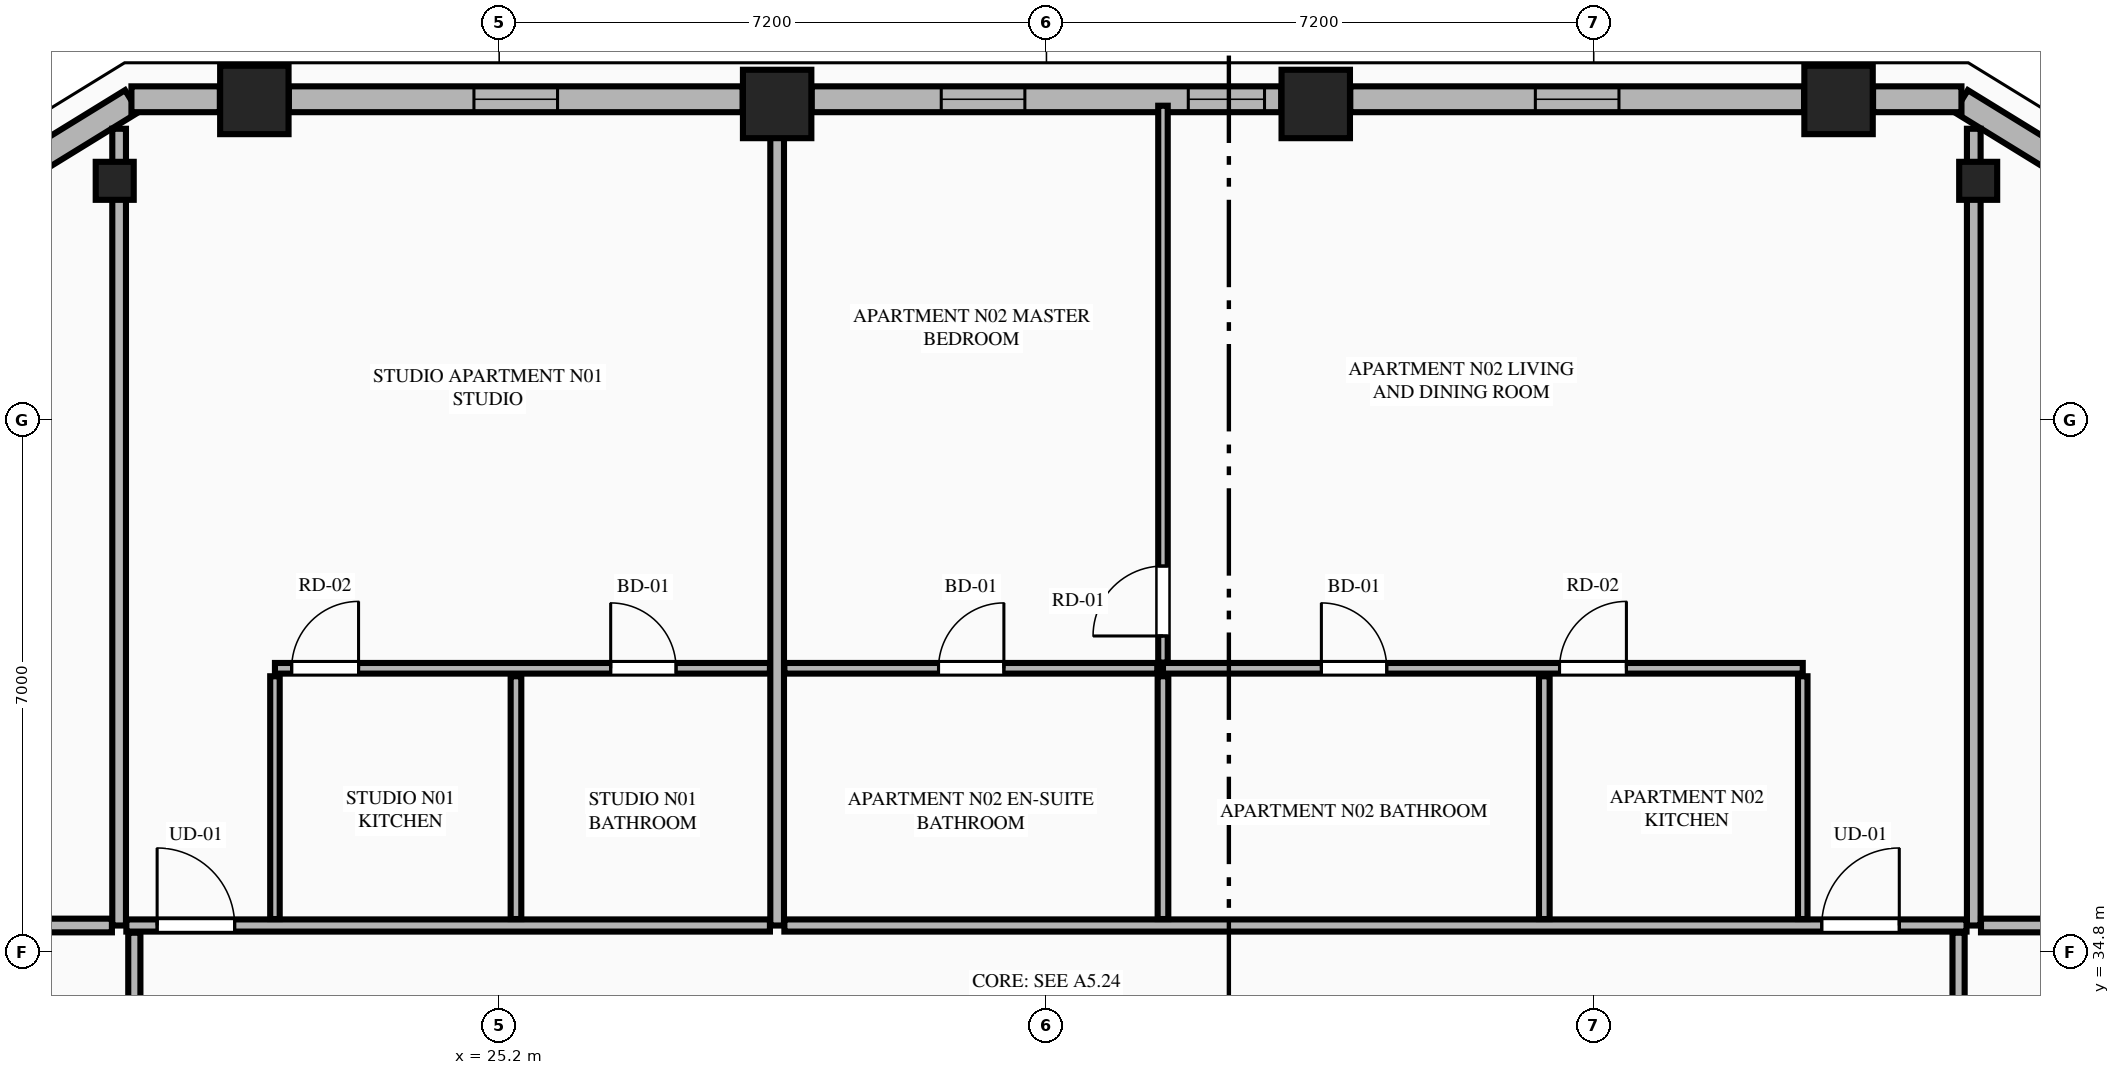
"""IFC4 building model, lengths in metres.
Left out: names, types, materials, properties, quantities, classifications, styles, units other than length and angle.
Written with IfcOpenShell. Run it as: python <this file> out.ifc"""

import sys

from ifc_helpers import new_model, si_unit, direction, frame, frame_2d, origin, origin_2d, place, context, subcontext, project, spatial, rectangle, extrude, element, fill, save


model = new_model("IFC4")
c1 = context("Model", 3, precision=1e-05, world=origin(), true_north=direction((0.0, 1.0)))
c2 = subcontext(c1, "Body", "Model", "MODEL_VIEW")
j1 = project(units=[si_unit("LENGTHUNIT", "METRE"), si_unit("PLANEANGLEUNIT", "RADIAN")], contexts=[c1])
p1 = place(None, origin())
s1 = spatial("IfcSite", under=j1, at=p1, CompositionType="ELEMENT")
p2 = place(p1, origin())
s2 = spatial("IfcBuilding", under=s1, at=p2, CompositionType="ELEMENT")
p3 = place(p2, frame((0.0, 0.0, 193.2)))
s3 = spatial("IfcBuildingStorey", under=s2, at=p3, CompositionType="ELEMENT", Elevation=193.2)
for number, where, z_axis, x_axis in (
    (1, (42.821, 46.011, 0.0), (0.0, 0.0, 1.0), (1.0, 0.0, 0.0)),
    (2, (35.943, 45.958, 0.0), (0.0, 0.0, 1.0), (1.0, 0.0, 0.0)),
    (3, (28.857, 45.958, 0.0), (0.0, 0.0, 1.0), (1.0, 0.0, 0.0)),
    (4, (21.979, 46.011, 0.0), (0.0, 0.0, 1.0), (1.0, 0.0, 0.0)),
):
    element("IfcColumn", number, at=place(p3, frame(where, z_axis=z_axis, x_axis=x_axis)), inside=s3, PredefinedType="COLUMN", context=c2, shape_type="SweptSolid", body=[
        extrude(rectangle(XDim=0.9, YDim=0.9, at=origin_2d()), origin(), (0.0, 0.0, 1.0), 3.55),
    ])
for number, where, z_axis, x_axis in (
    (5, (44.658, 44.947, 0.0), (0.0, 0.0, 1.0), (-0.865, 0.501, 0.0)),
    (6, (20.142, 44.947, 0.0), (0.0, 0.0, 1.0), (-0.865, -0.501, 0.0)),
):
    element("IfcColumn", number, at=place(p3, frame(where, z_axis=z_axis, x_axis=x_axis)), inside=s3, PredefinedType="PILASTER", context=c2, shape_type="SweptSolid", body=[
        extrude(rectangle(XDim=0.5, YDim=0.35, at=origin_2d()), origin(), (0.0, 0.0, 1.0), 3.55),
    ])
for number, where, z_axis, x_axis in (
    (7, (45.862, 45.116, 0.0), (0.0, 0.0, 1.0), (-0.852, 0.524, 0.0)),
    (8, (20.367, 45.995, 0.0), (0.0, 0.0, 1.0), (-0.852, -0.524, 0.0)),
):
    element("IfcWall", number, at=place(p3, frame(where, z_axis=z_axis, x_axis=x_axis)), inside=s3, PredefinedType="STANDARD", context=c2, shape_type="SweptSolid", body=[
        extrude(rectangle(XDim=1.678, YDim=0.34, at=frame_2d((0.839, 0.0))), origin(), (0.0, 0.0, 1.0), 3.35),
    ])
p4 = place(p3, frame((44.438, 46.02, 0.0), z_axis=(0.0, 0.0, 1.0), x_axis=(-1.0, 0.0, 0.0)))
e9 = element("IfcWall", 9, at=p4, inside=s3, PredefinedType="STANDARD", context=c2, shape_type="SweptSolid", body=[
    extrude(rectangle(XDim=1.163, YDim=0.34, at=frame_2d((0.582, 0.0))), origin(), (0.0, 0.0, 1.0), 3.35),
])
p5 = place(p3, frame((42.367, 46.02, 0.0), z_axis=(0.0, 0.0, 1.0), x_axis=(-1.0, 0.0, 0.0)))
e10 = element("IfcWall", 10, at=p5, inside=s3, PredefinedType="STANDARD", context=c2, shape_type="SweptSolid", body=[
    extrude(rectangle(XDim=5.97, YDim=0.34, at=frame_2d((2.985, 0.0))), origin(), (0.0, 0.0, 1.0), 2.883),
])
p6 = place(p5, frame((2.435, 0.0, 0.75)))
e11 = element("IfcOpeningElement", 11, at=p6, cuts=e10, PredefinedType="OPENING", context=c2, shape_type="SweptSolid", body=[
    extrude(rectangle(XDim=1.1, YDim=1.983, at=frame_2d((0.55, 0.991))), frame((0.0, 0.18, 0.0), z_axis=(0.0, -1.0, 0.0), x_axis=(1.0, 0.0, 0.0)), (0.0, 0.0, 1.0), 0.36),
])
p7 = place(p3, frame((35.489, 46.02, 0.0), z_axis=(0.0, 0.0, 1.0), x_axis=(-1.0, 0.0, 0.0)))
e12 = element("IfcWall", 12, at=p7, inside=s3, PredefinedType="STANDARD", context=c2, shape_type="SweptSolid", body=[
    extrude(rectangle(XDim=6.178, YDim=0.34, at=frame_2d((3.089, 0.0))), origin(), (0.0, 0.0, 1.0), 2.883),
])
p8 = place(p7, frame((0.22, 0.0, 0.75)))
e13 = element("IfcOpeningElement", 13, at=p8, cuts=e12, PredefinedType="OPENING", context=c2, shape_type="SweptSolid", body=[
    extrude(rectangle(XDim=1.003, YDim=1.983, at=frame_2d((0.501, 0.991))), frame((0.0, 0.18, 0.0), z_axis=(0.0, -1.0, 0.0), x_axis=(1.0, 0.0, 0.0)), (0.0, 0.0, 1.0), 0.36),
])
p9 = place(p7, frame((3.373, 0.0, 0.75)))
e14 = element("IfcOpeningElement", 14, at=p9, cuts=e12, PredefinedType="OPENING", context=c2, shape_type="SweptSolid", body=[
    extrude(rectangle(XDim=1.1, YDim=1.983, at=frame_2d((0.55, 0.991))), frame((0.0, 0.18, 0.0), z_axis=(0.0, -1.0, 0.0), x_axis=(1.0, 0.0, 0.0)), (0.0, 0.0, 1.0), 0.36),
])
p10 = place(p3, frame((28.403, 46.02, 0.0), z_axis=(0.0, 0.0, 1.0), x_axis=(-1.0, 0.0, 0.0)))
e15 = element("IfcWall", 15, at=p10, inside=s3, PredefinedType="STANDARD", context=c2, shape_type="SweptSolid", body=[
    extrude(rectangle(XDim=5.97, YDim=0.34, at=frame_2d((2.985, 0.0))), origin(), (0.0, 0.0, 1.0), 2.883),
])
p11 = place(p10, frame((2.435, 0.0, 0.75)))
e16 = element("IfcOpeningElement", 16, at=p11, cuts=e15, PredefinedType="OPENING", context=c2, shape_type="SweptSolid", body=[
    extrude(rectangle(XDim=1.1, YDim=1.983, at=frame_2d((0.55, 0.991))), frame((0.0, 0.18, 0.0), z_axis=(0.0, -1.0, 0.0), x_axis=(1.0, 0.0, 0.0)), (0.0, 0.0, 1.0), 0.36),
])
p12 = place(p3, frame((21.525, 46.02, 0.0), z_axis=(0.0, 0.0, 1.0), x_axis=(-1.0, 0.0, 0.0)))
e17 = element("IfcWall", 17, at=p12, inside=s3, PredefinedType="STANDARD", context=c2, shape_type="SweptSolid", body=[
    extrude(rectangle(XDim=1.163, YDim=0.34, at=frame_2d((0.582, 0.0))), origin(), (0.0, 0.0, 1.0), 3.35),
])
p13 = place(p3, frame((20.2, 35.15, 0.0), z_axis=(0.0, 0.0, 1.0), x_axis=(0.0, 1.0, 0.0)))
e18 = element("IfcWall", 18, at=p13, inside=s3, PredefinedType="PARTITIONING", context=c2, shape_type="SweptSolid", body=[
    extrude(rectangle(XDim=10.482, YDim=0.18, at=frame_2d((5.241, 0.0))), origin(), (0.0, 0.0, 1.0), 3.35),
])
p14 = place(p3, frame((28.857, 35.15, 0.0), z_axis=(0.0, 0.0, 1.0), x_axis=(0.0, 1.0, 0.0)))
e19 = element("IfcWall", 19, at=p14, inside=s3, PredefinedType="PARTITIONING", context=c2, shape_type="SweptSolid", body=[
    extrude(rectangle(XDim=10.695, YDim=0.18, at=frame_2d((5.348, 0.0))), origin(), (0.0, 0.0, 1.0), 2.807),
])
p15 = place(p3, frame((44.6, 35.15, 0.0), z_axis=(0.0, 0.0, 1.0), x_axis=(0.0, 1.0, 0.0)))
e20 = element("IfcWall", 20, at=p15, inside=s3, PredefinedType="PARTITIONING", context=c2, shape_type="SweptSolid", body=[
    extrude(rectangle(XDim=10.482, YDim=0.18, at=frame_2d((5.241, 0.0))), origin(), (0.0, 0.0, 1.0), 3.35),
])
p16 = place(p3, frame((20.295, 35.15, 0.0), z_axis=(0.0, 0.0, 1.0), x_axis=(1.0, 0.0, 0.0)))
e21 = element("IfcWall", 21, at=p16, inside=s3, PredefinedType="PARTITIONING", context=c2, shape_type="SweptSolid", body=[
    extrude(rectangle(XDim=8.467, YDim=0.16, at=frame_2d((4.233, 0.0))), origin(), (0.0, 0.0, 1.0), 3.35),
])
p17 = place(p16, frame((0.405, 0.0, 0.0)))
e22 = element("IfcOpeningElement", 22, at=p17, cuts=e21, PredefinedType="OPENING", context=c2, shape_type="SweptSolid", body=[
    extrude(rectangle(XDim=1.02, YDim=2.25, at=frame_2d((0.51, 1.125))), frame((0.0, 0.09, 0.0), z_axis=(0.0, -1.0, 0.0), x_axis=(1.0, 0.0, 0.0)), (0.0, 0.0, 1.0), 0.18),
])
p18 = place(p3, frame((22.25, 35.235, 0.0), z_axis=(0.0, 0.0, 1.0), x_axis=(0.0, 1.0, 0.0)))
e23 = element("IfcWall", 23, at=p18, inside=s3, PredefinedType="PARTITIONING", context=c2, shape_type="SweptSolid", body=[
    extrude(rectangle(XDim=3.194, YDim=0.125, at=frame_2d((1.597, 0.0))), origin(), (0.0, 0.0, 1.0), 2.807),
])
p19 = place(p3, frame((22.25, 38.534, 0.0), z_axis=(0.0, 0.0, 1.0), x_axis=(1.0, 0.0, 0.0)))
e24 = element("IfcWall", 24, at=p19, inside=s3, PredefinedType="PLUMBINGWALL", context=c2, shape_type="SweptSolid", body=[
    extrude(rectangle(XDim=6.512, YDim=0.14, at=frame_2d((3.256, 0.0))), origin(), (0.0, 0.0, 1.0), 3.35),
])
p20 = place(p19, frame((4.417, 0.0, 0.0)))
e25 = element("IfcOpeningElement", 25, at=p20, cuts=e24, PredefinedType="OPENING", context=c2, shape_type="SweptSolid", body=[
    extrude(rectangle(XDim=0.86, YDim=2.1, at=frame_2d((0.43, 1.05))), frame((0.0, 0.08, 0.0), z_axis=(0.0, -1.0, 0.0), x_axis=(1.0, 0.0, 0.0)), (0.0, 0.0, 1.0), 0.16),
])
p21 = place(p19, frame((0.22, 0.0, 0.0)))
e26 = element("IfcOpeningElement", 26, at=p21, cuts=e24, PredefinedType="OPENING", context=c2, shape_type="SweptSolid", body=[
    extrude(rectangle(XDim=0.88, YDim=2.15, at=frame_2d((0.44, 1.075))), frame((0.0, 0.08, 0.0), z_axis=(0.0, -1.0, 0.0), x_axis=(1.0, 0.0, 0.0)), (0.0, 0.0, 1.0), 0.16),
])
p22 = place(p3, frame((25.421, 35.235, 0.0), z_axis=(0.0, 0.0, 1.0), x_axis=(0.0, 1.0, 0.0)))
e27 = element("IfcWall", 27, at=p22, inside=s3, PredefinedType="PLUMBINGWALL", context=c2, shape_type="SweptSolid", body=[
    extrude(rectangle(XDim=3.194, YDim=0.14, at=frame_2d((1.597, 0.0))), origin(), (0.0, 0.0, 1.0), 3.35),
])
p23 = place(p3, frame((28.952, 35.15, 0.0), z_axis=(0.0, 0.0, 1.0), x_axis=(1.0, 0.0, 0.0)))
e28 = element("IfcWall", 28, at=p23, inside=s3, PredefinedType="PARTITIONING", context=c2, shape_type="SweptSolid", body=[
    extrude(rectangle(XDim=15.553, YDim=0.16, at=frame_2d((7.776, 0.0))), origin(), (0.0, 0.0, 1.0), 3.35),
])
p24 = place(p23, frame((13.648, 0.0, 0.0)))
e29 = element("IfcOpeningElement", 29, at=p24, cuts=e28, PredefinedType="OPENING", context=c2, shape_type="SweptSolid", body=[
    extrude(rectangle(XDim=1.02, YDim=2.25, at=frame_2d((0.51, 1.125))), frame((0.0, 0.09, 0.0), z_axis=(0.0, -1.0, 0.0), x_axis=(1.0, 0.0, 0.0)), (0.0, 0.0, 1.0), 0.18),
])
p25 = place(p3, frame((42.35, 35.235, 0.0), z_axis=(0.0, 0.0, 1.0), x_axis=(0.0, 1.0, 0.0)))
e30 = element("IfcWall", 30, at=p25, inside=s3, PredefinedType="PARTITIONING", context=c2, shape_type="SweptSolid", body=[
    extrude(rectangle(XDim=3.194, YDim=0.125, at=frame_2d((1.597, 0.0))), origin(), (0.0, 0.0, 1.0), 2.807),
])
p26 = place(p3, frame((33.933, 38.534, 0.0), z_axis=(0.0, 0.0, 1.0), x_axis=(1.0, 0.0, 0.0)))
e31 = element("IfcWall", 31, at=p26, inside=s3, PredefinedType="PLUMBINGWALL", context=c2, shape_type="SweptSolid", body=[
    extrude(rectangle(XDim=8.417, YDim=0.14, at=frame_2d((4.208, 0.0))), origin(), (0.0, 0.0, 1.0), 3.35),
])
p27 = place(p26, frame((2.084, 0.0, 0.0)))
e32 = element("IfcOpeningElement", 32, at=p27, cuts=e31, PredefinedType="OPENING", context=c2, shape_type="SweptSolid", body=[
    extrude(rectangle(XDim=0.86, YDim=2.1, at=frame_2d((0.43, 1.05))), frame((0.0, 0.08, 0.0), z_axis=(0.0, -1.0, 0.0), x_axis=(1.0, 0.0, 0.0)), (0.0, 0.0, 1.0), 0.16),
])
p28 = place(p26, frame((5.217, 0.0, 0.0)))
e33 = element("IfcOpeningElement", 33, at=p28, cuts=e31, PredefinedType="OPENING", context=c2, shape_type="SweptSolid", body=[
    extrude(rectangle(XDim=0.88, YDim=2.15, at=frame_2d((0.44, 1.075))), frame((0.0, 0.08, 0.0), z_axis=(0.0, -1.0, 0.0), x_axis=(1.0, 0.0, 0.0)), (0.0, 0.0, 1.0), 0.16),
])
p29 = place(p3, frame((28.952, 38.534, 0.0), z_axis=(0.0, 0.0, 1.0), x_axis=(1.0, 0.0, 0.0)))
e34 = element("IfcWall", 34, at=p29, inside=s3, PredefinedType="PLUMBINGWALL", context=c2, shape_type="SweptSolid", body=[
    extrude(rectangle(XDim=4.906, YDim=0.14, at=frame_2d((2.453, 0.0))), origin(), (0.0, 0.0, 1.0), 3.35),
])
p30 = place(p29, frame((2.028, 0.0, 0.0)))
e35 = element("IfcOpeningElement", 35, at=p30, cuts=e34, PredefinedType="OPENING", context=c2, shape_type="SweptSolid", body=[
    extrude(rectangle(XDim=0.86, YDim=2.1, at=frame_2d((0.43, 1.05))), frame((0.0, 0.08, 0.0), z_axis=(0.0, -1.0, 0.0), x_axis=(1.0, 0.0, 0.0)), (0.0, 0.0, 1.0), 0.16),
])
for number, where, z_axis, x_axis in (
    (36, (38.95, 35.235, 0.0), (0.0, 0.0, 1.0), (0.0, 1.0, 0.0)),
    (37, (33.933, 35.235, 0.0), (0.0, 0.0, 1.0), (0.0, 1.0, 0.0)),
):
    element("IfcWall", number, at=place(p3, frame(where, z_axis=z_axis, x_axis=x_axis)), inside=s3, PredefinedType="PLUMBINGWALL", context=c2, shape_type="SweptSolid", body=[
        extrude(rectangle(XDim=3.194, YDim=0.14, at=frame_2d((1.597, 0.0))), origin(), (0.0, 0.0, 1.0), 3.35),
    ])
p31 = place(p3, frame((33.933, 38.609, 0.0), z_axis=(0.0, 0.0, 1.0), x_axis=(0.0, 1.0, 0.0)))
e38 = element("IfcWall", 38, at=p31, inside=s3, PredefinedType="PARTITIONING", context=c2, shape_type="SweptSolid", body=[
    extrude(rectangle(XDim=7.326, YDim=0.125, at=frame_2d((3.663, 0.0))), origin(), (0.0, 0.0, 1.0), 3.35),
])
p32 = place(p31, frame((0.35, 0.0, 0.0)))
e39 = element("IfcOpeningElement", 39, at=p32, cuts=e38, PredefinedType="OPENING", context=c2, shape_type="SweptSolid", body=[
    extrude(rectangle(XDim=0.92, YDim=2.15, at=frame_2d((0.46, 1.075))), frame((0.0, 0.073, 0.0), z_axis=(0.0, -1.0, 0.0), x_axis=(1.0, 0.0, 0.0)), (0.0, 0.0, 1.0), 0.145),
])
for number, where, z_axis, x_axis in (
    (40, (14.11, 35.15, 0.0), (0.0, 0.0, 1.0), (1.0, 0.0, 0.0)),
    (41, (44.695, 35.15, 0.0), (0.0, 0.0, 1.0), (1.0, 0.0, 0.0)),
):
    element("IfcWall", number, at=place(p3, frame(where, z_axis=z_axis, x_axis=x_axis)), inside=s3, PredefinedType="PARTITIONING", context=c2, shape_type="SweptSolid", body=[
        extrude(rectangle(XDim=5.995, YDim=0.18, at=frame_2d((2.998, 0.0))), origin(), (0.0, 0.0, 1.0), 3.35),
    ])
p33 = place(p3, frame((20.4, 26.551, 0.0), z_axis=(0.0, 0.0, 1.0), x_axis=(0.0, 1.0, 0.0)))
e42 = element("IfcWall", 42, at=p33, inside=s3, PredefinedType="PARTITIONING", context=c2, shape_type="SweptSolid", body=[
    extrude(rectangle(XDim=8.504, YDim=0.16, at=frame_2d((4.252, 0.0))), origin(), (0.0, 0.0, 1.0), 3.35),
])
p34 = place(p33, frame((0.4, 0.0, 0.0)))
e43 = element("IfcOpeningElement", 43, at=p34, cuts=e42, PredefinedType="OPENING", context=c2, shape_type="SweptSolid", body=[
    extrude(rectangle(XDim=1.02, YDim=2.25, at=frame_2d((0.51, 1.125))), frame((0.0, 0.09, 0.0), z_axis=(0.0, -1.0, 0.0), x_axis=(1.0, 0.0, 0.0)), (0.0, 0.0, 1.0), 0.18),
])
p35 = place(p3, frame((44.4, 16.345, 0.0), z_axis=(0.0, 0.0, 1.0), x_axis=(0.0, 1.0, 0.0)))
e44 = element("IfcWall", 44, at=p35, inside=s3, PredefinedType="PARTITIONING", context=c2, shape_type="SweptSolid", body=[
    extrude(rectangle(XDim=18.71, YDim=0.16, at=frame_2d((9.355, 0.0))), origin(), (0.0, 0.0, 1.0), 3.35),
])
p36 = place(p35, frame((0.45, 0.0, 0.0)))
e45 = element("IfcOpeningElement", 45, at=p36, cuts=e44, PredefinedType="OPENING", context=c2, shape_type="SweptSolid", body=[
    extrude(rectangle(XDim=1.02, YDim=2.25, at=frame_2d((0.51, 1.125))), frame((0.0, 0.09, 0.0), z_axis=(0.0, -1.0, 0.0), x_axis=(1.0, 0.0, 0.0)), (0.0, 0.0, 1.0), 0.18),
])
p37 = place(p6, origin())
e46 = element("IfcWindow", 46, at=p37, inside=s3, PartitioningType="SINGLE_PANEL", PredefinedType="WINDOW", context=c2, shape_type="SweptSolid", body=[
    extrude(rectangle(XDim=1.1, YDim=1.983, at=frame_2d((0.55, 0.991))), frame((0.0, 0.03, 0.0), z_axis=(0.0, -1.0, 0.0), x_axis=(1.0, 0.0, 0.0)), (0.0, 0.0, 1.0), 0.06),
])
fill(e11, e46)
p38 = place(p8, origin())
e47 = element("IfcWindow", 47, at=p38, inside=s3, PartitioningType="SINGLE_PANEL", PredefinedType="WINDOW", context=c2, shape_type="SweptSolid", body=[
    extrude(rectangle(XDim=1.003, YDim=1.983, at=frame_2d((0.501, 0.991))), frame((0.0, 0.03, 0.0), z_axis=(0.0, -1.0, 0.0), x_axis=(1.0, 0.0, 0.0)), (0.0, 0.0, 1.0), 0.06),
])
fill(e13, e47)
p39 = place(p11, origin())
e48 = element("IfcWindow", 48, at=p39, inside=s3, PartitioningType="SINGLE_PANEL", PredefinedType="WINDOW", context=c2, shape_type="SweptSolid", body=[
    extrude(rectangle(XDim=1.1, YDim=1.983, at=frame_2d((0.55, 0.991))), frame((0.0, 0.03, 0.0), z_axis=(0.0, -1.0, 0.0), x_axis=(1.0, 0.0, 0.0)), (0.0, 0.0, 1.0), 0.06),
])
fill(e16, e48)
p40 = place(p20, origin())
e49 = element("IfcDoor", 49, at=p40, inside=s3, OperationType="SINGLE_SWING_LEFT", PredefinedType="DOOR", context=c2, shape_type="SweptSolid", body=[
    extrude(rectangle(XDim=0.86, YDim=2.1, at=frame_2d((0.43, 1.05))), frame((0.0, 0.025, 0.0), z_axis=(0.0, -1.0, 0.0), x_axis=(1.0, 0.0, 0.0)), (0.0, 0.0, 1.0), 0.05),
])
fill(e25, e49)
p41 = place(p17, origin())
e50 = element("IfcDoor", 50, at=p41, inside=s3, OperationType="SINGLE_SWING_LEFT", PredefinedType="DOOR", context=c2, shape_type="SweptSolid", body=[
    extrude(rectangle(XDim=1.02, YDim=2.25, at=frame_2d((0.51, 1.125))), frame((0.0, 0.025, 0.0), z_axis=(0.0, -1.0, 0.0), x_axis=(1.0, 0.0, 0.0)), (0.0, 0.0, 1.0), 0.05),
])
fill(e22, e50)
p42 = place(p21, origin())
e51 = element("IfcDoor", 51, at=p42, inside=s3, OperationType="SINGLE_SWING_RIGHT", PredefinedType="DOOR", context=c2, shape_type="SweptSolid", body=[
    extrude(rectangle(XDim=0.88, YDim=2.15, at=frame_2d((0.44, 1.075))), frame((0.0, 0.025, 0.0), z_axis=(0.0, -1.0, 0.0), x_axis=(1.0, 0.0, 0.0)), (0.0, 0.0, 1.0), 0.05),
])
fill(e26, e51)
p43 = place(p27, origin())
e52 = element("IfcDoor", 52, at=p43, inside=s3, OperationType="SINGLE_SWING_LEFT", PredefinedType="DOOR", context=c2, shape_type="SweptSolid", body=[
    extrude(rectangle(XDim=0.86, YDim=2.1, at=frame_2d((0.43, 1.05))), frame((0.0, 0.025, 0.0), z_axis=(0.0, -1.0, 0.0), x_axis=(1.0, 0.0, 0.0)), (0.0, 0.0, 1.0), 0.05),
])
fill(e32, e52)
p44 = place(p30, origin())
e53 = element("IfcDoor", 53, at=p44, inside=s3, OperationType="SINGLE_SWING_RIGHT", PredefinedType="DOOR", context=c2, shape_type="SweptSolid", body=[
    extrude(rectangle(XDim=0.86, YDim=2.1, at=frame_2d((0.43, 1.05))), frame((0.0, 0.025, 0.0), z_axis=(0.0, -1.0, 0.0), x_axis=(1.0, 0.0, 0.0)), (0.0, 0.0, 1.0), 0.05),
])
fill(e35, e53)
p45 = place(p24, origin())
e54 = element("IfcDoor", 54, at=p45, inside=s3, OperationType="SINGLE_SWING_RIGHT", PredefinedType="DOOR", context=c2, shape_type="SweptSolid", body=[
    extrude(rectangle(XDim=1.02, YDim=2.25, at=frame_2d((0.51, 1.125))), frame((0.0, 0.025, 0.0), z_axis=(0.0, -1.0, 0.0), x_axis=(1.0, 0.0, 0.0)), (0.0, 0.0, 1.0), 0.05),
])
fill(e29, e54)
p46 = place(p28, origin())
e55 = element("IfcDoor", 55, at=p46, inside=s3, OperationType="SINGLE_SWING_RIGHT", PredefinedType="DOOR", context=c2, shape_type="SweptSolid", body=[
    extrude(rectangle(XDim=0.88, YDim=2.15, at=frame_2d((0.44, 1.075))), frame((0.0, 0.025, 0.0), z_axis=(0.0, -1.0, 0.0), x_axis=(1.0, 0.0, 0.0)), (0.0, 0.0, 1.0), 0.05),
])
fill(e33, e55)
p47 = place(p32, origin())
e56 = element("IfcDoor", 56, at=p47, inside=s3, OperationType="SINGLE_SWING_LEFT", PredefinedType="DOOR", context=c2, shape_type="SweptSolid", body=[
    extrude(rectangle(XDim=0.92, YDim=2.15, at=frame_2d((0.46, 1.075))), frame((0.0, 0.025, 0.0), z_axis=(0.0, -1.0, 0.0), x_axis=(1.0, 0.0, 0.0)), (0.0, 0.0, 1.0), 0.05),
])
fill(e39, e56)
p48 = place(p9, origin())
e57 = element("IfcWindow", 57, at=p48, inside=s3, PartitioningType="SINGLE_PANEL", PredefinedType="WINDOW", context=c2, shape_type="SweptSolid", body=[
    extrude(rectangle(XDim=1.1, YDim=1.983, at=frame_2d((0.55, 0.991))), frame((0.0, 0.03, 0.0), z_axis=(0.0, -1.0, 0.0), x_axis=(1.0, 0.0, 0.0)), (0.0, 0.0, 1.0), 0.06),
])
fill(e14, e57)
save(model, sys.argv[1])
